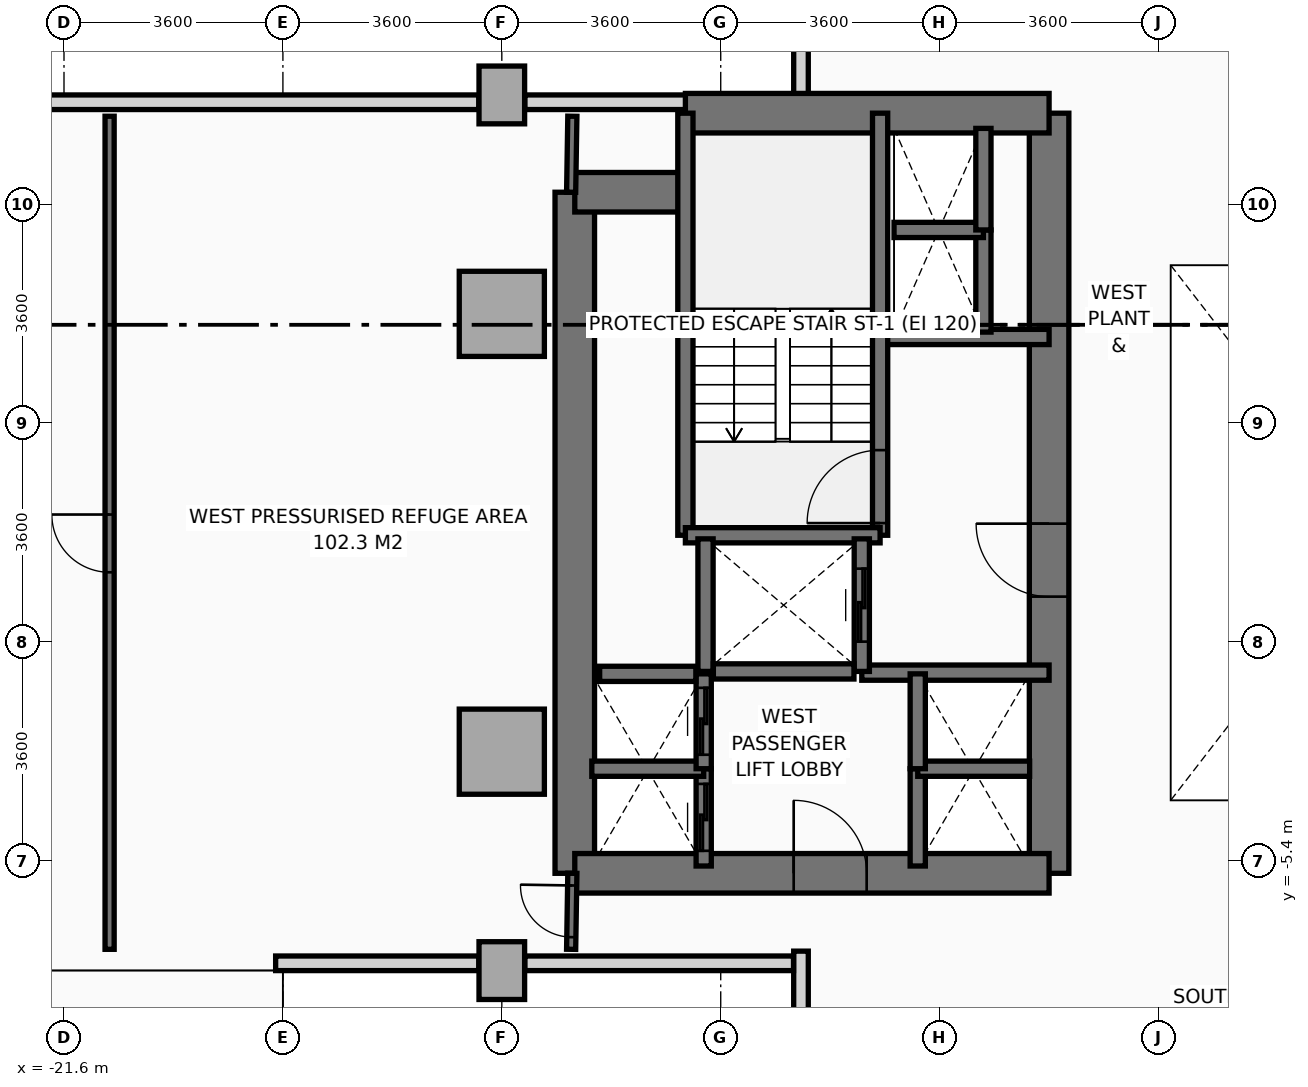
"""IFC4 building model, lengths in metres.
Left out: names, types, materials, properties, quantities, classifications, styles, units other than length and angle.
Written with IfcOpenShell. Run it as: python <this file> out.ifc"""

import sys

from ifc_helpers import new_model, si_unit, direction, frame, frame_2d, origin, origin_2d, place, context, subcontext, project, spatial, rectangle, extrude, source, transform, mapped, element, fill, save


model = new_model("IFC4")
c1 = context("Model", 3, precision=1e-05, world=origin(), true_north=direction((0.0, 1.0)))
c2 = subcontext(c1, "Body", "Model", "MODEL_VIEW")
j1 = project(units=[si_unit("LENGTHUNIT", "METRE"), si_unit("PLANEANGLEUNIT", "RADIAN")], contexts=[c1])
p1 = place(None, origin())
s1 = spatial("IfcSite", under=j1, at=p1, CompositionType="ELEMENT")
p2 = place(p1, origin())
s2 = spatial("IfcBuilding", under=s1, at=p2, CompositionType="ELEMENT")
p3 = place(p2, frame((0.0, 0.0, 25.2)))
s3 = spatial("IfcBuildingStorey", under=s2, at=p3, CompositionType="ELEMENT", Elevation=25.2)
m1 = source(origin(), c2, "Body", "SweptSolid", [
    extrude(rectangle(XDim=0.75, YDim=0.95, at=origin_2d()), origin(), (0.0, 0.0, 1.0), 5.2),
])
p4 = place(p3, frame((-14.4, -7.2, 0.0), z_axis=(0.0, 0.0, 1.0), x_axis=(1.0, 0.0, 0.0)))
e1 = element("IfcColumn", 1, at=p4, inside=s3, PredefinedType="COLUMN", context=c2, shape_type="MappedRepresentation", body=[
    mapped(m1, transform((0.0, 0.0, 0.0), x_axis=(1.0, 0.0, 0.0), y_axis=(0.0, 1.0, 0.0), z_axis=(0.0, 0.0, 1.0), scale=1.0)),
])
m2 = source(origin(), c2, "Body", "SweptSolid", [
    extrude(rectangle(XDim=1.4, YDim=1.4, at=origin_2d()), origin(), (0.0, 0.0, 1.0), 5.2),
])
for number, where, z_axis, x_axis in (
    (2, (-14.4, -3.6, 0.0), (0.0, 0.0, 1.0), (1.0, 0.0, 0.0)),
    (3, (-14.4, 3.6, 0.0), (0.0, 0.0, 1.0), (1.0, 0.0, 0.0)),
):
    element("IfcColumn", number, at=place(p3, frame(where, z_axis=z_axis, x_axis=x_axis)), inside=s3, PredefinedType="COLUMN", context=c2, shape_type="MappedRepresentation", body=[
        mapped(m2, transform((0.0, 0.0, 0.0), x_axis=(1.0, 0.0, 0.0), y_axis=(0.0, 1.0, 0.0), z_axis=(0.0, 0.0, 1.0), scale=1.0)),
    ])
p5 = place(p3, frame((-14.4, 7.2, 0.0), z_axis=(0.0, 0.0, 1.0), x_axis=(1.0, 0.0, 0.0)))
e4 = element("IfcColumn", 4, at=p5, inside=s3, PredefinedType="COLUMN", context=c2, shape_type="MappedRepresentation", body=[
    mapped(m1, transform((0.0, 0.0, 0.0), x_axis=(1.0, 0.0, 0.0), y_axis=(0.0, 1.0, 0.0), z_axis=(0.0, 0.0, 1.0), scale=1.0)),
])
p6 = place(p3, frame((-9.48, -8.789, 0.0), z_axis=(0.0, 0.0, 1.0), x_axis=(0.0, 1.0, 0.0)))
e5 = element("IfcWall", 5, at=p6, inside=s3, PredefinedType="PARAPET", context=c2, shape_type="SweptSolid", body=[
    extrude(rectangle(XDim=1.909, YDim=0.24, at=frame_2d((0.955, 0.0))), origin(), (0.0, 0.0, 1.0), 1.15),
])
p7 = place(p3, frame((-9.603, -7.08, 0.0), z_axis=(0.0, 0.0, 1.0), x_axis=(-1.0, 0.0, 0.0)))
e6 = element("IfcWall", 6, at=p7, inside=s3, PredefinedType="PARAPET", context=c2, shape_type="SweptSolid", body=[
    extrude(rectangle(XDim=4.419, YDim=0.24, at=frame_2d((2.209, 0.0))), origin(), (0.0, 0.0, 1.0), 1.15),
])
p8 = place(p3, frame((-14.778, -7.08, 0.0), z_axis=(0.0, 0.0, 1.0), x_axis=(-1.0, 0.0, 0.0)))
e7 = element("IfcWall", 7, at=p8, inside=s3, PredefinedType="PARAPET", context=c2, shape_type="SweptSolid", body=[
    extrude(rectangle(XDim=3.341, YDim=0.24, at=frame_2d((1.671, 0.0))), origin(), (0.0, 0.0, 1.0), 1.15),
])
p9 = place(p3, frame((-24.822, 7.08, 0.0), z_axis=(0.0, 0.0, 1.0), x_axis=(1.0, 0.0, 0.0)))
e8 = element("IfcWall", 8, at=p9, inside=s3, PredefinedType="PARAPET", context=c2, shape_type="SweptSolid", body=[
    extrude(rectangle(XDim=10.044, YDim=0.24, at=frame_2d((5.022, 0.0))), origin(), (0.0, 0.0, 1.0), 1.15),
])
p10 = place(p3, frame((-14.022, 7.08, 0.0), z_axis=(0.0, 0.0, 1.0), x_axis=(1.0, 0.0, 0.0)))
e9 = element("IfcWall", 9, at=p10, inside=s3, PredefinedType="PARAPET", context=c2, shape_type="SweptSolid", body=[
    extrude(rectangle(XDim=2.727, YDim=0.24, at=frame_2d((1.364, 0.0))), origin(), (0.0, 0.0, 1.0), 1.15),
])
p11 = place(p3, frame((-9.48, 6.953, 0.0), z_axis=(0.0, 0.0, 1.0), x_axis=(0.0, 1.0, 0.0)))
e10 = element("IfcWall", 10, at=p11, inside=s3, PredefinedType="PARAPET", context=c2, shape_type="SweptSolid", body=[
    extrude(rectangle(XDim=1.836, YDim=0.24, at=frame_2d((0.918, 0.0))), origin(), (0.0, 0.0, 1.0), 1.15),
])
p12 = place(p3, frame((-13.2, -5.6, 0.0), z_axis=(0.0, 0.0, 1.0), x_axis=(0.0, 1.0, 0.0)))
e11 = element("IfcWall", 11, at=p12, inside=s3, PredefinedType="SHEAR", context=c2, shape_type="SweptSolid", body=[
    extrude(rectangle(XDim=11.2, YDim=0.65, at=frame_2d((5.6, 0.0))), origin(), (0.0, 0.0, 1.0), 5.2),
])
p13 = place(p3, frame((-5.4, -5.6, 0.0), z_axis=(0.0, 0.0, 1.0), x_axis=(0.0, 1.0, 0.0)))
e12 = element("IfcWall", 12, at=p13, inside=s3, PredefinedType="SHEAR", context=c2, shape_type="SweptSolid", body=[
    extrude(rectangle(XDim=12.5, YDim=0.65, at=frame_2d((6.25, 0.0))), origin(), (0.0, 0.0, 1.0), 5.2),
])
p14 = place(p13, frame((4.55, 0.0, 0.0)))
e13 = element("IfcOpeningElement", 13, at=p14, cuts=e12, PredefinedType="OPENING", context=c2, shape_type="SweptSolid", body=[
    extrude(rectangle(XDim=1.2, YDim=2.2, at=frame_2d((0.6, 1.1))), frame((0.0, 0.335, 0.0), z_axis=(0.0, -1.0, 0.0), x_axis=(1.0, 0.0, 0.0)), (0.0, 0.0, 1.0), 0.67),
])
p15 = place(p3, frame((-11.381, 6.9, 0.0), z_axis=(0.0, 0.0, 1.0), x_axis=(1.0, 0.0, 0.0)))
e14 = element("IfcWall", 14, at=p15, inside=s3, PredefinedType="SHEAR", context=c2, shape_type="SweptSolid", body=[
    extrude(rectangle(XDim=5.981, YDim=0.65, at=frame_2d((2.991, 0.0))), origin(), (0.0, 0.0, 1.0), 5.2),
])
p16 = place(p3, frame((-13.2, 5.6, 0.0), z_axis=(0.0, 0.0, 1.0), x_axis=(1.0, 0.0, 0.0)))
e15 = element("IfcWall", 15, at=p16, inside=s3, PredefinedType="SHEAR", context=c2, shape_type="SweptSolid", body=[
    extrude(rectangle(XDim=1.819, YDim=0.65, at=frame_2d((0.909, 0.0))), origin(), (0.0, 0.0, 1.0), 5.2),
])
p17 = place(p3, frame((-13.2, -5.6, 0.0), z_axis=(0.0, 0.0, 1.0), x_axis=(1.0, 0.0, 0.0)))
e16 = element("IfcWall", 16, at=p17, inside=s3, PredefinedType="SHEAR", context=c2, shape_type="SweptSolid", body=[
    extrude(rectangle(XDim=7.8, YDim=0.65, at=frame_2d((3.9, 0.0))), origin(), (0.0, 0.0, 1.0), 5.2),
])
p18 = place(p17, frame((3.6, 0.0, 0.0)))
e17 = element("IfcOpeningElement", 17, at=p18, cuts=e16, PredefinedType="OPENING", context=c2, shape_type="SweptSolid", body=[
    extrude(rectangle(XDim=1.2, YDim=2.2, at=frame_2d((0.6, 1.1))), frame((0.0, 0.335, 0.0), z_axis=(0.0, -1.0, 0.0), x_axis=(1.0, 0.0, 0.0)), (0.0, 0.0, 1.0), 0.67),
])
p19 = place(p3, frame((-8.18, 3.22, 0.0), z_axis=(0.0, 0.0, 1.0), x_axis=(1.0, 0.0, 0.0)))
e18 = element("IfcWall", 18, at=p19, inside=s3, PredefinedType="SOLIDWALL", context=c2, shape_type="SweptSolid", body=[
    extrude(rectangle(XDim=2.78, YDim=0.25, at=frame_2d((1.39, 0.0))), origin(), (0.0, 0.0, 1.0), 5.2),
])
p20 = place(p3, frame((-8.48, -2.3, 0.0), z_axis=(0.0, 0.0, 1.0), x_axis=(1.0, 0.0, 0.0)))
e19 = element("IfcWall", 19, at=p20, inside=s3, PredefinedType="SOLIDWALL", context=c2, shape_type="SweptSolid", body=[
    extrude(rectangle(XDim=3.08, YDim=0.25, at=frame_2d((1.54, 0.0))), origin(), (0.0, 0.0, 1.0), 5.2),
])
p21 = place(p3, frame((-8.179, -0.041, 0.0), z_axis=(0.0, 0.0, 1.0), x_axis=(0.0, 1.0, 0.0)))
e20 = element("IfcWall", 20, at=p21, inside=s3, PredefinedType="SOLIDWALL", context=c2, shape_type="SweptSolid", body=[
    extrude(rectangle(XDim=6.941, YDim=0.25, at=frame_2d((3.47, 0.0))), origin(), (0.0, 0.0, 1.0), 5.2),
])
p22 = place(p21, frame((0.2, 0.0, 0.0)))
e21 = element("IfcOpeningElement", 21, at=p22, cuts=e20, PredefinedType="OPENING", context=c2, shape_type="SweptSolid", body=[
    extrude(rectangle(XDim=1.2, YDim=2.2, at=frame_2d((0.6, 1.1))), frame((0.0, 0.135, 0.0), z_axis=(0.0, -1.0, 0.0), x_axis=(1.0, 0.0, 0.0)), (0.0, 0.0, 1.0), 0.27),
])
p23 = place(p3, frame((-11.381, -0.041, 0.0), z_axis=(0.0, 0.0, 1.0), x_axis=(0.0, 1.0, 0.0)))
e22 = element("IfcWall", 22, at=p23, inside=s3, PredefinedType="SOLIDWALL", context=c2, shape_type="SweptSolid", body=[
    extrude(rectangle(XDim=6.941, YDim=0.25, at=frame_2d((3.47, 0.0))), origin(), (0.0, 0.0, 1.0), 5.2),
])
p24 = place(p3, frame((-11.381, -0.041, 0.0), z_axis=(0.0, 0.0, 1.0), x_axis=(1.0, 0.0, 0.0)))
e23 = element("IfcWall", 23, at=p24, inside=s3, PredefinedType="SOLIDWALL", context=c2, shape_type="SweptSolid", body=[
    extrude(rectangle(XDim=3.202, YDim=0.25, at=frame_2d((1.601, 0.0))), origin(), (0.0, 0.0, 1.0), 5.2),
])
p25 = place(p3, frame((-11.05, -2.28, 0.0), z_axis=(0.0, 0.0, 1.0), x_axis=(0.0, 1.0, 0.0)))
e24 = element("IfcWall", 24, at=p25, inside=s3, PredefinedType="SOLIDWALL", context=c2, shape_type="SweptSolid", body=[
    extrude(rectangle(XDim=2.18, YDim=0.25, at=frame_2d((1.09, 0.0))), origin(), (0.0, 0.0, 1.0), 5.2),
])
p26 = place(p3, frame((-8.48, -2.28, 0.0), z_axis=(0.0, 0.0, 1.0), x_axis=(0.0, 1.0, 0.0)))
e25 = element("IfcWall", 25, at=p26, inside=s3, PredefinedType="SOLIDWALL", context=c2, shape_type="SweptSolid", body=[
    extrude(rectangle(XDim=2.18, YDim=0.25, at=frame_2d((1.09, 0.0))), origin(), (0.0, 0.0, 1.0), 5.2),
])
p27 = place(p26, frame((0.49, 0.0, 0.0)))
e26 = element("IfcOpeningElement", 26, at=p27, cuts=e25, PredefinedType="OPENING", context=c2, shape_type="SweptSolid", body=[
    extrude(rectangle(XDim=1.2, YDim=2.2, at=frame_2d((0.6, 1.1))), frame((0.0, 0.135, 0.0), z_axis=(0.0, -1.0, 0.0), x_axis=(1.0, 0.0, 0.0)), (0.0, 0.0, 1.0), 0.27),
])
p28 = place(p3, frame((-10.921, -2.28, 0.0), z_axis=(0.0, 0.0, 1.0), x_axis=(1.0, 0.0, 0.0)))
e27 = element("IfcWall", 27, at=p28, inside=s3, PredefinedType="SOLIDWALL", context=c2, shape_type="SweptSolid", body=[
    extrude(rectangle(XDim=2.312, YDim=0.25, at=frame_2d((1.156, 0.0))), origin(), (0.0, 0.0, 1.0), 5.2),
])
p29 = place(p3, frame((-11.08, -5.48, 0.0), z_axis=(0.0, 0.0, 1.0), x_axis=(0.0, 1.0, 0.0)))
e28 = element("IfcWall", 28, at=p29, inside=s3, PredefinedType="SOLIDWALL", context=c2, shape_type="SweptSolid", body=[
    extrude(rectangle(XDim=1.6, YDim=0.25, at=frame_2d((0.8, 0.0))), origin(), (0.0, 0.0, 1.0), 5.2),
])
p30 = place(p29, frame((0.25, 0.0, 0.0)))
e29 = element("IfcOpeningElement", 29, at=p30, cuts=e28, PredefinedType="OPENING", context=c2, shape_type="SweptSolid", body=[
    extrude(rectangle(XDim=1.1, YDim=2.2, at=frame_2d((0.55, 1.1))), frame((0.0, 0.135, 0.0), z_axis=(0.0, -1.0, 0.0), x_axis=(1.0, 0.0, 0.0)), (0.0, 0.0, 1.0), 0.27),
])
p31 = place(p3, frame((-12.92, -3.88, 0.0), z_axis=(0.0, 0.0, 1.0), x_axis=(1.0, 0.0, 0.0)))
e30 = element("IfcWall", 30, at=p31, inside=s3, PredefinedType="SOLIDWALL", context=c2, shape_type="SweptSolid", body=[
    extrude(rectangle(XDim=1.84, YDim=0.25, at=frame_2d((0.92, 0.0))), origin(), (0.0, 0.0, 1.0), 5.2),
])
p32 = place(p3, frame((-11.08, -3.88, 0.0), z_axis=(0.0, 0.0, 1.0), x_axis=(0.0, 1.0, 0.0)))
e31 = element("IfcWall", 31, at=p32, inside=s3, PredefinedType="SOLIDWALL", context=c2, shape_type="SweptSolid", body=[
    extrude(rectangle(XDim=1.56, YDim=0.25, at=frame_2d((0.78, 0.0))), origin(), (0.0, 0.0, 1.0), 5.2),
])
p33 = place(p32, frame((0.23, 0.0, 0.0)))
e32 = element("IfcOpeningElement", 32, at=p33, cuts=e31, PredefinedType="OPENING", context=c2, shape_type="SweptSolid", body=[
    extrude(rectangle(XDim=1.1, YDim=2.2, at=frame_2d((0.55, 1.1))), frame((0.0, 0.135, 0.0), z_axis=(0.0, -1.0, 0.0), x_axis=(1.0, 0.0, 0.0)), (0.0, 0.0, 1.0), 0.27),
])
p34 = place(p3, frame((-12.791, -2.32, 0.0), z_axis=(0.0, 0.0, 1.0), x_axis=(1.0, 0.0, 0.0)))
e33 = element("IfcWall", 33, at=p34, inside=s3, PredefinedType="SOLIDWALL", context=c2, shape_type="SweptSolid", body=[
    extrude(rectangle(XDim=1.582, YDim=0.25, at=frame_2d((0.791, 0.0))), origin(), (0.0, 0.0, 1.0), 5.2),
])
p35 = place(p3, frame((-7.56, -5.48, 0.0), z_axis=(0.0, 0.0, 1.0), x_axis=(0.0, 1.0, 0.0)))
e34 = element("IfcWall", 34, at=p35, inside=s3, PredefinedType="SOLIDWALL", context=c2, shape_type="SweptSolid", body=[
    extrude(rectangle(XDim=1.6, YDim=0.25, at=frame_2d((0.8, 0.0))), origin(), (0.0, 0.0, 1.0), 5.2),
])
p36 = place(p3, frame((-7.56, -3.88, 0.0), z_axis=(0.0, 0.0, 1.0), x_axis=(1.0, 0.0, 0.0)))
e35 = element("IfcWall", 35, at=p36, inside=s3, PredefinedType="SOLIDWALL", context=c2, shape_type="SweptSolid", body=[
    extrude(rectangle(XDim=1.84, YDim=0.25, at=frame_2d((0.92, 0.0))), origin(), (0.0, 0.0, 1.0), 5.2),
])
p37 = place(p3, frame((-7.56, -3.88, 0.0), z_axis=(0.0, 0.0, 1.0), x_axis=(0.0, 1.0, 0.0)))
e36 = element("IfcWall", 36, at=p37, inside=s3, PredefinedType="SOLIDWALL", context=c2, shape_type="SweptSolid", body=[
    extrude(rectangle(XDim=1.56, YDim=0.25, at=frame_2d((0.78, 0.0))), origin(), (0.0, 0.0, 1.0), 5.2),
])
p38 = place(p3, frame((-6.48, 3.3, 0.0), z_axis=(0.0, 0.0, 1.0), x_axis=(0.0, 1.0, 0.0)))
e37 = element("IfcWall", 37, at=p38, inside=s3, PredefinedType="SOLIDWALL", context=c2, shape_type="SweptSolid", body=[
    extrude(rectangle(XDim=1.68, YDim=0.25, at=frame_2d((0.84, 0.0))), origin(), (0.0, 0.0, 1.0), 5.2),
])
p39 = place(p3, frame((-7.95, 4.98, 0.0), z_axis=(0.0, 0.0, 1.0), x_axis=(1.0, 0.0, 0.0)))
e38 = element("IfcWall", 38, at=p39, inside=s3, PredefinedType="SOLIDWALL", context=c2, shape_type="SweptSolid", body=[
    extrude(rectangle(XDim=1.47, YDim=0.25, at=frame_2d((0.735, 0.0))), origin(), (0.0, 0.0, 1.0), 5.2),
])
p40 = place(p3, frame((-6.48, 4.98, 0.0), z_axis=(0.0, 0.0, 1.0), x_axis=(0.0, 1.0, 0.0)))
e39 = element("IfcWall", 39, at=p40, inside=s3, PredefinedType="SOLIDWALL", context=c2, shape_type="SweptSolid", body=[
    extrude(rectangle(XDim=1.67, YDim=0.25, at=frame_2d((0.835, 0.0))), origin(), (0.0, 0.0, 1.0), 5.2),
])
p41 = place(p3, frame((-13.26, -6.85, 0.0), z_axis=(0.0, 0.0, 1.0), x_axis=(0.016013571389, 0.999871774545, 0.0)))
e40 = element("IfcWall", 40, at=p41, inside=s3, PredefinedType="PARTITIONING", context=c2, shape_type="SweptSolid", body=[
    extrude(rectangle(XDim=1.25, YDim=0.15, at=frame_2d((0.625, 0.0))), origin(), (0.0, 0.0, 1.0), 5.2),
])
p42 = place(p41, frame((0.2, 0.0, 0.0)))
e41 = element("IfcOpeningElement", 41, at=p42, cuts=e40, PredefinedType="OPENING", context=c2, shape_type="SweptSolid", body=[
    extrude(rectangle(XDim=0.85, YDim=2.1, at=frame_2d((0.425, 1.05))), frame((0.0, 0.085, 0.0), z_axis=(0.0, -1.0, 0.0), x_axis=(1.0, 0.0, 0.0)), (0.0, 0.0, 1.0), 0.17),
])
p43 = place(p3, frame((-13.26, 5.6, 0.0), z_axis=(0.0, 0.0, 1.0), x_axis=(0.016013571389, 0.999871774545, 0.0)))
e42 = element("IfcWall", 42, at=p43, inside=s3, PredefinedType="PARTITIONING", context=c2, shape_type="SweptSolid", body=[
    extrude(rectangle(XDim=1.25, YDim=0.15, at=frame_2d((0.625, 0.0))), origin(), (0.0, 0.0, 1.0), 5.2),
])
p44 = place(p3, frame((-20.85, -6.85, 0.0), z_axis=(0.0, 0.0, 1.0), x_axis=(0.0, 1.0, 0.0)))
e43 = element("IfcWall", 43, at=p44, inside=s3, PredefinedType="PARTITIONING", context=c2, shape_type="SweptSolid", body=[
    extrude(rectangle(XDim=13.7, YDim=0.15, at=frame_2d((6.85, 0.0))), origin(), (0.0, 0.0, 1.0), 3.4),
])
p45 = place(p44, frame((6.2, 0.0, 0.0)))
e44 = element("IfcOpeningElement", 44, at=p45, cuts=e43, PredefinedType="OPENING", context=c2, shape_type="SweptSolid", body=[
    extrude(rectangle(XDim=0.95, YDim=2.15, at=frame_2d((0.475, 1.075))), frame((0.0, 0.085, 0.0), z_axis=(0.0, -1.0, 0.0), x_axis=(1.0, 0.0, 0.0)), (0.0, 0.0, 1.0), 0.17),
])
m3 = source(origin(), c2, "Body", "SweptSolid", [
    extrude(rectangle(XDim=1.2, YDim=2.2, at=frame_2d((0.6, 1.1))), frame((0.0, 0.025, 0.0), z_axis=(0.0, -1.0, 0.0), x_axis=(1.0, 0.0, 0.0)), (0.0, 0.0, 1.0), 0.05),
])
p46 = place(p22, origin())
e45 = element("IfcDoor", 45, at=p46, inside=s3, OperationType="SINGLE_SWING_LEFT", PredefinedType="DOOR", context=c2, shape_type="MappedRepresentation", body=[
    mapped(m3, transform((0.0, 0.0, 0.0), x_axis=(1.0, 0.0, 0.0), y_axis=(0.0, 1.0, 0.0), z_axis=(0.0, 0.0, 1.0), scale=1.0)),
])
fill(e21, e45)
p47 = place(p14, origin())
e46 = element("IfcDoor", 46, at=p47, inside=s3, OperationType="SINGLE_SWING_RIGHT", PredefinedType="DOOR", context=c2, shape_type="MappedRepresentation", body=[
    mapped(m3, transform((0.0, 0.0, 0.0), x_axis=(1.0, 0.0, 0.0), y_axis=(0.0, 1.0, 0.0), z_axis=(0.0, 0.0, 1.0), scale=1.0)),
])
fill(e13, e46)
p48 = place(p18, origin())
e47 = element("IfcDoor", 47, at=p48, inside=s3, OperationType="SINGLE_SWING_LEFT", PredefinedType="DOOR", context=c2, shape_type="MappedRepresentation", body=[
    mapped(m3, transform((0.0, 0.0, 0.0), x_axis=(1.0, 0.0, 0.0), y_axis=(0.0, 1.0, 0.0), z_axis=(0.0, 0.0, 1.0), scale=1.0)),
])
fill(e17, e47)
p49 = place(p27, origin())
e48 = element("IfcDoor", 48, at=p49, inside=s3, OperationType="SLIDING_TO_RIGHT", PredefinedType="DOOR", context=c2, shape_type="MappedRepresentation", body=[
    mapped(m3, transform((0.0, 0.0, 0.0), x_axis=(1.0, 0.0, 0.0), y_axis=(0.0, 1.0, 0.0), z_axis=(0.0, 0.0, 1.0), scale=1.0)),
])
fill(e26, e48)
m4 = source(origin(), c2, "Body", "SweptSolid", [
    extrude(rectangle(XDim=1.1, YDim=2.2, at=frame_2d((0.55, 1.1))), frame((0.0, 0.025, 0.0), z_axis=(0.0, -1.0, 0.0), x_axis=(1.0, 0.0, 0.0)), (0.0, 0.0, 1.0), 0.05),
])
p50 = place(p30, origin())
e49 = element("IfcDoor", 49, at=p50, inside=s3, OperationType="SLIDING_TO_LEFT", PredefinedType="DOOR", context=c2, shape_type="MappedRepresentation", body=[
    mapped(m4, transform((0.0, 0.0, 0.0), x_axis=(1.0, 0.0, 0.0), y_axis=(0.0, 1.0, 0.0), z_axis=(0.0, 0.0, 1.0), scale=1.0)),
])
fill(e29, e49)
p51 = place(p33, origin())
e50 = element("IfcDoor", 50, at=p51, inside=s3, OperationType="SLIDING_TO_LEFT", PredefinedType="DOOR", context=c2, shape_type="MappedRepresentation", body=[
    mapped(m4, transform((0.0, 0.0, 0.0), x_axis=(1.0, 0.0, 0.0), y_axis=(0.0, 1.0, 0.0), z_axis=(0.0, 0.0, 1.0), scale=1.0)),
])
fill(e32, e50)
m5 = source(origin(), c2, "Body", "SweptSolid", [
    extrude(rectangle(XDim=0.95, YDim=2.15, at=frame_2d((0.475, 1.075))), frame((0.0, 0.025, 0.0), z_axis=(0.0, -1.0, 0.0), x_axis=(1.0, 0.0, 0.0)), (0.0, 0.0, 1.0), 0.05),
])
p52 = place(p45, origin())
e51 = element("IfcDoor", 51, at=p52, inside=s3, OperationType="SINGLE_SWING_RIGHT", PredefinedType="DOOR", context=c2, shape_type="MappedRepresentation", body=[
    mapped(m5, transform((0.0, 0.0, 0.0), x_axis=(1.0, 0.0, 0.0), y_axis=(0.0, 1.0, 0.0), z_axis=(0.0, 0.0, 1.0), scale=1.0)),
])
fill(e44, e51)
m6 = source(origin(), c2, "Body", "SweptSolid", [
    extrude(rectangle(XDim=0.85, YDim=2.1, at=frame_2d((0.425, 1.05))), frame((0.0, 0.025, 0.0), z_axis=(0.0, -1.0, 0.0), x_axis=(1.0, 0.0, 0.0)), (0.0, 0.0, 1.0), 0.05),
])
p53 = place(p42, origin())
e52 = element("IfcDoor", 52, at=p53, inside=s3, OperationType="SINGLE_SWING_RIGHT", PredefinedType="DOOR", context=c2, shape_type="MappedRepresentation", body=[
    mapped(m6, transform((0.0, 0.0, 0.0), x_axis=(1.0, 0.0, 0.0), y_axis=(0.0, 1.0, 0.0), z_axis=(0.0, 0.0, 1.0), scale=1.0)),
])
fill(e41, e52)
save(model, sys.argv[1])
